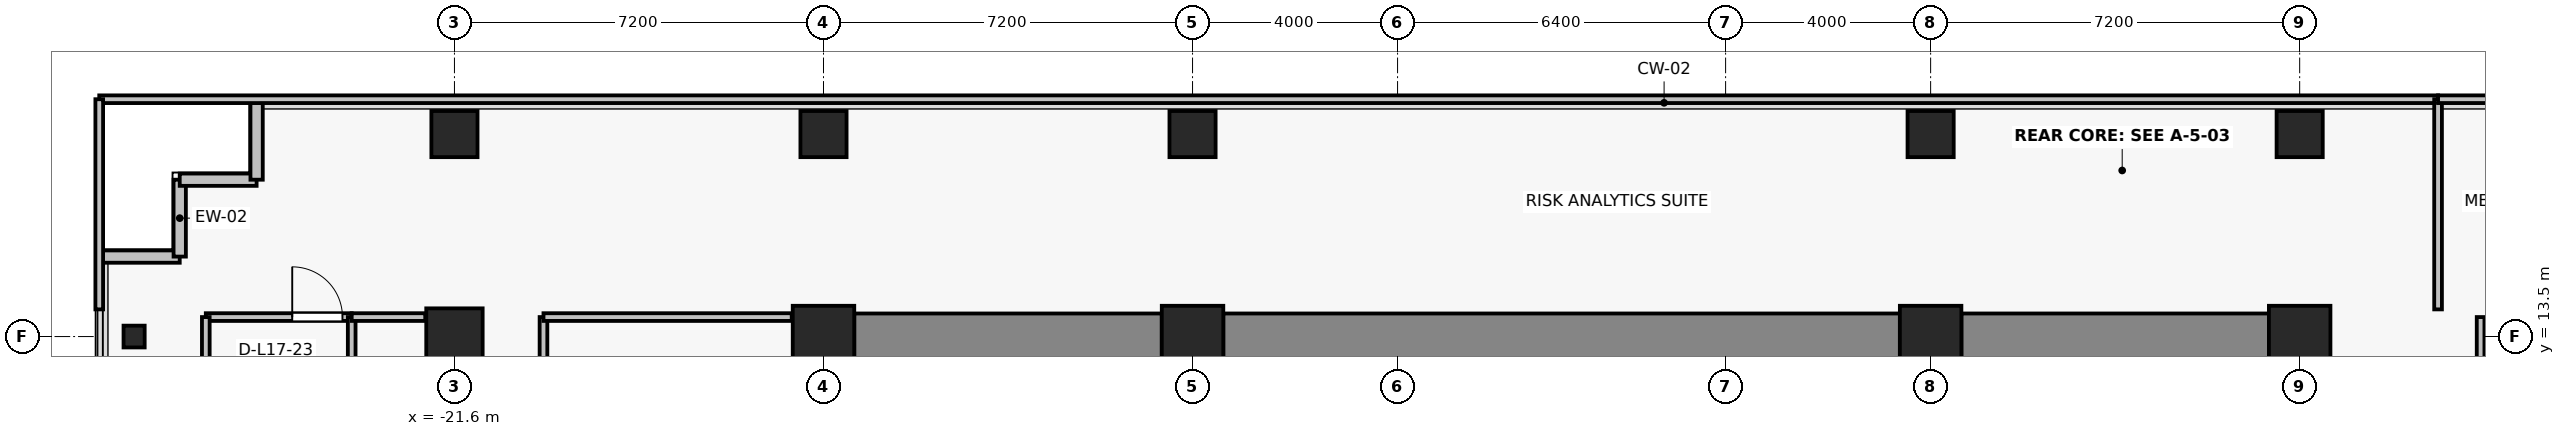
"""IFC4 building model, lengths in metres.
Left out: names, types, materials, properties, quantities, classifications, styles, units other than length and angle.
Written with IfcOpenShell. Run it as: python <this file> out.ifc"""

import sys

from ifc_helpers import new_model, si_unit, direction, frame, frame_2d, origin, origin_2d, place, context, subcontext, project, spatial, rectangle, i_section, extrude, source, transform, mapped, element, fill, save


model = new_model("IFC4")
c1 = context("Model", 3, precision=1e-05, world=origin(), true_north=direction((0.0, 1.0)))
c2 = subcontext(c1, "Body", "Model", "MODEL_VIEW")
j1 = project(units=[si_unit("LENGTHUNIT", "METRE"), si_unit("PLANEANGLEUNIT", "RADIAN")], contexts=[c1])
p1 = place(None, origin())
s1 = spatial("IfcSite", under=j1, at=p1, CompositionType="ELEMENT")
p2 = place(p1, origin())
s2 = spatial("IfcBuilding", under=s1, at=p2, CompositionType="ELEMENT")
p3 = place(p2, frame((0.0, 0.0, 63.7)))
s3 = spatial("IfcBuildingStorey", under=s2, at=p3, CompositionType="ELEMENT", Elevation=63.7)
for number, where, z_axis, x_axis in (
    (1, (-14.4, 13.5, 0.0), (0.0, 0.0, 1.0), (1.0, 0.0, 0.0)),
    (2, (-7.2, 13.5, 0.0), (0.0, 0.0, 1.0), (1.0, 0.0, 0.0)),
    (3, (7.2, 13.5, 0.0), (0.0, 0.0, 1.0), (1.0, 0.0, 0.0)),
    (4, (14.4, 13.5, 0.0), (0.0, 0.0, 1.0), (1.0, 0.0, 0.0)),
):
    element("IfcColumn", number, at=place(p3, frame(where, z_axis=z_axis, x_axis=x_axis)), inside=s3, PredefinedType="COLUMN", context=c2, shape_type="SweptSolid", body=[
        extrude(rectangle(XDim=1.2, YDim=1.2, at=origin_2d()), origin(), (0.0, 0.0, 1.0), 3.3),
    ])
p4 = place(p3, frame((-21.6, 13.5, 0.0), z_axis=(0.0, 0.0, 1.0), x_axis=(1.0, 0.0, 0.0)))
e5 = element("IfcColumn", 5, at=p4, inside=s3, PredefinedType="COLUMN", context=c2, shape_type="SweptSolid", body=[
    extrude(rectangle(XDim=1.1, YDim=1.1, at=origin_2d()), origin(), (0.0, 0.0, 1.0), 3.3),
])
for number, where, z_axis, x_axis in (
    (6, (-14.4, 17.45, 0.0), (0.0, 0.0, 1.0), (1.0, 0.0, 0.0)),
    (7, (-7.2, 17.45, 0.0), (0.0, 0.0, 1.0), (1.0, 0.0, 0.0)),
    (8, (7.2, 17.45, 0.0), (0.0, 0.0, 1.0), (1.0, 0.0, 0.0)),
    (9, (14.4, 17.45, 0.0), (0.0, 0.0, 1.0), (1.0, 0.0, 0.0)),
    (10, (-21.6, 17.45, 0.0), (0.0, 0.0, 1.0), (1.0, 0.0, 0.0)),
):
    element("IfcColumn", number, at=place(p3, frame(where, z_axis=z_axis, x_axis=x_axis)), inside=s3, PredefinedType="COLUMN", context=c2, shape_type="SweptSolid", body=[
        extrude(rectangle(XDim=0.9, YDim=0.9, at=origin_2d()), origin(), (0.0, 0.0, 1.0), 3.3),
    ])
p5 = place(p3, frame((-27.85, 13.5, 0.0), z_axis=(0.0, 0.0, 1.0), x_axis=(1.0, 0.0, 0.0)))
e11 = element("IfcColumn", 11, at=p5, inside=s3, PredefinedType="COLUMN", context=c2, shape_type="SweptSolid", body=[
    extrude(i_section(OverallWidth=0.412, OverallDepth=0.425, WebThickness=0.026, FlangeThickness=0.039, FilletRadius=0.015, at=origin_2d()), origin(), (0.0, 0.0, 1.0), 3.3),
])
p6 = place(p3, frame((-13.8, 13.5, 0.0), z_axis=(0.0, 0.0, 1.0), x_axis=(1.0, 0.0, 0.0)))
e12 = element("IfcWall", 12, at=p6, inside=s3, PredefinedType="SHEAR", context=c2, shape_type="SweptSolid", body=[
    extrude(rectangle(XDim=6.0, YDim=0.9, at=frame_2d((3.0, 0.0))), origin(), (0.0, 0.0, 1.0), 3.075),
])
p7 = place(p3, frame((-6.6, 13.5, 0.0), z_axis=(0.0, 0.0, 1.0), x_axis=(1.0, 0.0, 0.0)))
e13 = element("IfcWall", 13, at=p7, inside=s3, PredefinedType="SHEAR", context=c2, shape_type="SweptSolid", body=[
    extrude(rectangle(XDim=13.2, YDim=0.9, at=frame_2d((6.6, 0.0))), origin(), (0.0, 0.0, 1.0), 3.075),
])
p8 = place(p3, frame((7.8, 13.5, 0.0), z_axis=(0.0, 0.0, 1.0), x_axis=(1.0, 0.0, 0.0)))
e14 = element("IfcWall", 14, at=p8, inside=s3, PredefinedType="SHEAR", context=c2, shape_type="SweptSolid", body=[
    extrude(rectangle(XDim=6.0, YDim=0.9, at=frame_2d((3.0, 0.0))), origin(), (0.0, 0.0, 1.0), 3.075),
])
for number, where, z_axis, x_axis in (
    (15, (-26.96, 15.06, 0.0), (0.0, 0.0, 1.0), (-1.0, 0.0, 0.0)),
    (16, (-26.96, 16.56, 0.0), (0.0, 0.0, 1.0), (0.0, -1.0, 0.0)),
    (17, (-25.46, 16.56, 0.0), (0.0, 0.0, 1.0), (-1.0, 0.0, 0.0)),
    (18, (-25.46, 18.06, 0.0), (0.0, 0.0, 1.0), (0.0, -1.0, 0.0)),
):
    element("IfcWall", number, at=place(p3, frame(where, z_axis=z_axis, x_axis=x_axis)), inside=s3, PredefinedType="SOLIDWALL", context=c2, shape_type="SweptSolid", body=[
        extrude(rectangle(XDim=1.5, YDim=0.24, at=frame_2d((0.75, 0.0))), origin(), (0.0, 0.0, 1.0), 3.075),
    ])
p9 = place(p3, frame((-26.451, 13.88, 0.0), z_axis=(0.0, 0.0, 1.0), x_axis=(1.0, 0.0, 0.0)))
e19 = element("IfcWall", 19, at=p9, inside=s3, PredefinedType="PARTITIONING", context=c2, shape_type="SweptSolid", body=[
    extrude(rectangle(XDim=2.846, YDim=0.15, at=frame_2d((1.423, 0.0))), origin(), (0.0, 0.0, 1.0), 3.075),
])
p10 = place(p9, frame((1.686, 0.0, 0.0)))
e20 = element("IfcOpeningElement", 20, at=p10, cuts=e19, PredefinedType="OPENING", context=c2, shape_type="SweptSolid", body=[
    extrude(rectangle(XDim=0.98, YDim=2.15, at=frame_2d((0.49, 1.075))), frame((0.0, 0.085, 0.0), z_axis=(0.0, -1.0, 0.0), x_axis=(1.0, 0.0, 0.0)), (0.0, 0.0, 1.0), 0.17),
])
for number, where, z_axis, x_axis in (
    (21, (-26.451, -1.77, 0.0), (0.0, 0.0, 1.0), (0.0, 1.0, 0.0)),
    (22, (-23.605, 13.88, 0.0), (0.0, 0.0, 1.0), (0.0, -1.0, 0.0)),
):
    element("IfcWall", number, at=place(p3, frame(where, z_axis=z_axis, x_axis=x_axis)), inside=s3, PredefinedType="PARTITIONING", context=c2, shape_type="SweptSolid", body=[
        extrude(rectangle(XDim=15.65, YDim=0.15, at=frame_2d((7.825, 0.0))), origin(), (0.0, 0.0, 1.0), 2.465),
    ])
p11 = place(p3, frame((-23.605, 13.88, 0.0), z_axis=(0.0, 0.0, 1.0), x_axis=(1.0, 0.0, 0.0)))
e23 = element("IfcWall", 23, at=p11, inside=s3, PredefinedType="PARTITIONING", context=c2, shape_type="SweptSolid", body=[
    extrude(rectangle(XDim=1.435, YDim=0.15, at=frame_2d((0.718, 0.0))), origin(), (0.0, 0.0, 1.0), 3.075),
])
p12 = place(p3, frame((-19.863, 13.88, 0.0), z_axis=(0.0, 0.0, 1.0), x_axis=(0.0, -1.0, 0.0)))
e24 = element("IfcWall", 24, at=p12, inside=s3, PredefinedType="PARTITIONING", context=c2, shape_type="SweptSolid", body=[
    extrude(rectangle(XDim=15.65, YDim=0.15, at=frame_2d((7.825, 0.0))), origin(), (0.0, 0.0, 1.0), 2.465),
])
p13 = place(p3, frame((-19.863, 13.88, 0.0), z_axis=(0.0, 0.0, 1.0), x_axis=(1.0, 0.0, 0.0)))
e25 = element("IfcWall", 25, at=p13, inside=s3, PredefinedType="PARTITIONING", context=c2, shape_type="SweptSolid", body=[
    extrude(rectangle(XDim=4.843, YDim=0.15, at=frame_2d((2.421, 0.0))), origin(), (0.0, 0.0, 1.0), 3.075),
])
p14 = place(p3, frame((17.93, 4.522, 0.0), z_axis=(0.0, 0.0, 1.0), x_axis=(0.0, 1.0, 0.0)))
e26 = element("IfcWall", 26, at=p14, inside=s3, PredefinedType="PARTITIONING", context=c2, shape_type="SweptSolid", body=[
    extrude(rectangle(XDim=9.358, YDim=0.15, at=frame_2d((4.679, 0.0))), origin(), (0.0, 0.0, 1.0), 2.465),
])
p15 = place(p14, frame((4.189, 0.0, 0.0)))
e27 = element("IfcOpeningElement", 27, at=p15, cuts=e26, PredefinedType="OPENING", context=c2, shape_type="SweptSolid", body=[
    extrude(rectangle(XDim=0.98, YDim=2.15, at=frame_2d((0.49, 1.075))), frame((0.0, 0.085, 0.0), z_axis=(0.0, -1.0, 0.0), x_axis=(1.0, 0.0, 0.0)), (0.0, 0.0, 1.0), 0.17),
])
p16 = place(p3, frame((-28.53, 18.13, 0.0), z_axis=(0.0, 0.0, 1.0), x_axis=(1.0, 0.0, 0.0)))
e28 = element("IfcWall", 28, at=p16, inside=s3, PredefinedType="PARTITIONING", context=c2, shape_type="SweptSolid", body=[
    extrude(rectangle(XDim=45.63, YDim=0.15, at=frame_2d((22.815, 0.0))), origin(), (0.0, 0.0, 1.0), 3.075),
])
p17 = place(p3, frame((-28.53, 14.03, 0.0), z_axis=(0.0, 0.0, 1.0), x_axis=(0.0, 1.0, 0.0)))
e29 = element("IfcWall", 29, at=p17, inside=s3, PredefinedType="PARTITIONING", context=c2, shape_type="SweptSolid", body=[
    extrude(rectangle(XDim=4.1, YDim=0.15, at=frame_2d((2.05, 0.0))), origin(), (0.0, 0.0, 1.0), 3.075),
])
p18 = place(p3, frame((17.1, 18.13, 0.0), z_axis=(0.0, 0.0, 1.0), x_axis=(0.0, -1.0, 0.0)))
e30 = element("IfcWall", 30, at=p18, inside=s3, PredefinedType="PARTITIONING", context=c2, shape_type="SweptSolid", body=[
    extrude(rectangle(XDim=4.1, YDim=0.15, at=frame_2d((2.05, 0.0))), origin(), (0.0, 0.0, 1.0), 2.465),
])
p19 = place(p3, frame((17.1, 18.13, 0.0), z_axis=(0.0, 0.0, 1.0), x_axis=(1.0, 0.0, 0.0)))
e31 = element("IfcWall", 31, at=p19, inside=s3, PredefinedType="PARTITIONING", context=c2, shape_type="SweptSolid", body=[
    extrude(rectangle(XDim=15.43, YDim=0.15, at=frame_2d((7.715, 0.0))), origin(), (0.0, 0.0, 1.0), 3.075),
])
m1 = source(origin(), c2, "Body", "SweptSolid", [
    extrude(rectangle(XDim=0.98, YDim=2.15, at=frame_2d((0.49, 1.075))), frame((0.0, 0.025, 0.0), z_axis=(0.0, -1.0, 0.0), x_axis=(1.0, 0.0, 0.0)), (0.0, 0.0, 1.0), 0.05),
])
p20 = place(p10, origin())
e32 = element("IfcDoor", 32, at=p20, inside=s3, OperationType="SINGLE_SWING_LEFT", PredefinedType="DOOR", context=c2, shape_type="MappedRepresentation", body=[
    mapped(m1, transform((0.0, 0.0, 0.0), x_axis=(1.0, 0.0, 0.0), y_axis=(0.0, 1.0, 0.0), z_axis=(0.0, 0.0, 1.0), scale=1.0)),
])
fill(e20, e32)
save(model, sys.argv[1])
